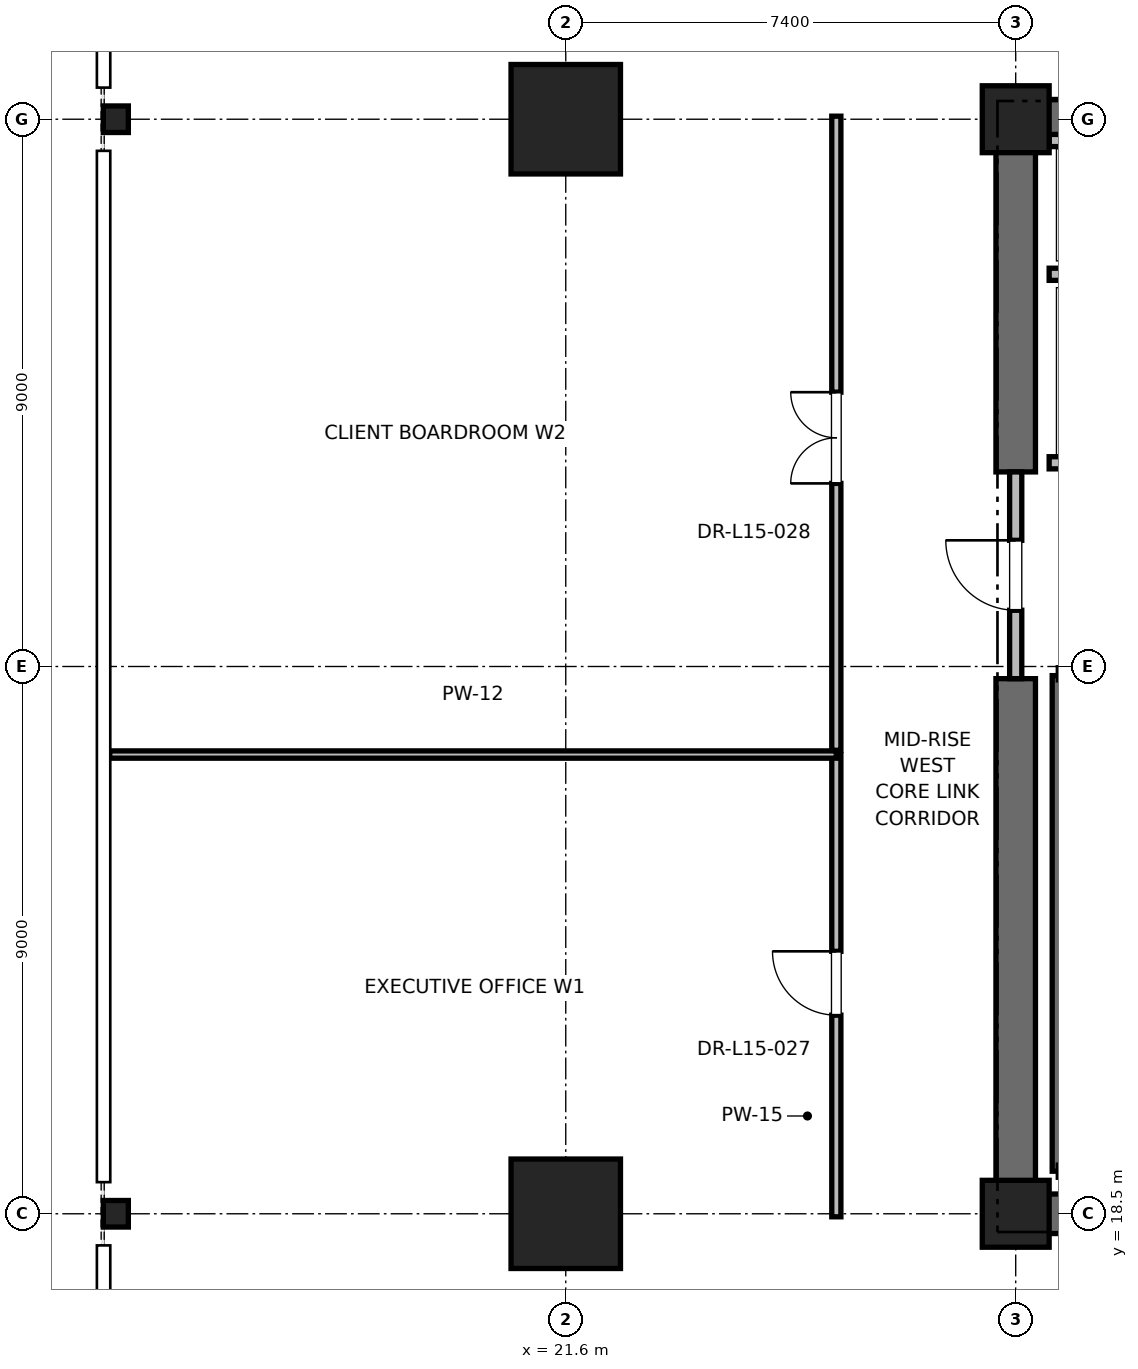
"""IFC4 building model, lengths in metres.
Left out: names, types, materials, properties, quantities, classifications, styles, units other than length and angle.
Written with IfcOpenShell. Run it as: python <this file> out.ifc"""

import sys

from ifc_helpers import new_model, si_unit, direction, frame, frame_2d, origin, origin_2d, place, context, subcontext, project, spatial, rectangle, i_section, extrude, element, fill, save


model = new_model("IFC4")
c1 = context("Model", 3, precision=1e-05, world=origin(), true_north=direction((0.0, 1.0)))
c2 = subcontext(c1, "Body", "Model", "MODEL_VIEW")
j1 = project(units=[si_unit("LENGTHUNIT", "METRE"), si_unit("PLANEANGLEUNIT", "RADIAN")], contexts=[c1])
p1 = place(None, origin())
s1 = spatial("IfcSite", under=j1, at=p1, CompositionType="ELEMENT")
p2 = place(p1, origin())
s2 = spatial("IfcBuilding", under=s1, at=p2, CompositionType="ELEMENT")
p3 = place(p2, frame((0.0, 0.0, 67.6)))
s3 = spatial("IfcBuildingStorey", under=s2, at=p3, CompositionType="ELEMENT", Elevation=67.6)
for number, where, z_axis, x_axis in (
    (1, (21.6, 18.5, 0.0), (0.0, 0.0, 1.0), (1.0, 0.0, 0.0)),
    (2, (21.6, 36.5, 0.0), (0.0, 0.0, 1.0), (1.0, 0.0, 0.0)),
):
    element("IfcColumn", number, at=place(p3, frame(where, z_axis=z_axis, x_axis=x_axis)), inside=s3, PredefinedType="COLUMN", context=c2, shape_type="SweptSolid", body=[
        extrude(rectangle(XDim=1.8, YDim=1.8, at=origin_2d()), origin(), (0.0, 0.0, 1.0), 4.0),
    ])
for number, where, z_axis, x_axis in (
    (3, (14.2, 18.5, 0.0), (0.0, 0.0, 1.0), (1.0, 0.0, 0.0)),
    (4, (14.2, 36.5, 0.0), (0.0, 0.0, 1.0), (1.0, 0.0, 0.0)),
):
    element("IfcColumn", number, at=place(p3, frame(where, z_axis=z_axis, x_axis=x_axis)), inside=s3, PredefinedType="COLUMN", context=c2, shape_type="SweptSolid", body=[
        extrude(i_section(OverallWidth=0.412, OverallDepth=0.437, WebThickness=0.036, FlangeThickness=0.058, FilletRadius=0.015, at=origin_2d()), origin(), (0.0, 0.0, 1.0), 4.0),
    ])
for number, where, z_axis, x_axis in (
    (5, (29.0, 18.5, 0.0), (0.0, 0.0, 1.0), (1.0, 0.0, 0.0)),
    (6, (29.0, 36.5, 0.0), (0.0, 0.0, 1.0), (1.0, 0.0, 0.0)),
):
    element("IfcColumn", number, at=place(p3, frame(where, z_axis=z_axis, x_axis=x_axis)), inside=s3, PredefinedType="PILASTER", context=c2, shape_type="SweptSolid", body=[
        extrude(rectangle(XDim=1.1, YDim=1.1, at=origin_2d()), origin(), (0.0, 0.0, 1.0), 4.0),
    ])
p4 = place(p3, frame((29.0, 18.5, 0.0), z_axis=(0.0, 0.0, 1.0), x_axis=(1.0, 0.0, 0.0)))
e7 = element("IfcWall", 7, at=p4, inside=s3, PredefinedType="SHEAR", context=c2, shape_type="SweptSolid", body=[
    extrude(rectangle(XDim=9.2, YDim=0.65, at=frame_2d((4.6, 0.0))), origin(), (0.0, 0.0, 1.0), 3.76),
])
p5 = place(p3, frame((29.0, 36.5, 0.0), z_axis=(0.0, 0.0, 1.0), x_axis=(1.0, 0.0, 0.0)))
e8 = element("IfcWall", 8, at=p5, inside=s3, PredefinedType="SHEAR", context=c2, shape_type="SweptSolid", body=[
    extrude(rectangle(XDim=5.8, YDim=0.65, at=frame_2d((2.9, 0.0))), origin(), (0.0, 0.0, 1.0), 3.76),
])
p6 = place(p3, frame((29.0, 18.5, 0.0), z_axis=(0.0, 0.0, 1.0), x_axis=(0.0, 1.0, 0.0)))
e9 = element("IfcWall", 9, at=p6, inside=s3, PredefinedType="SHEAR", context=c2, shape_type="SweptSolid", body=[
    extrude(rectangle(XDim=8.8, YDim=0.65, at=frame_2d((4.4, 0.0))), origin(), (0.0, 0.0, 1.0), 3.76),
])
p7 = place(p3, frame((29.0, 30.7, 0.0), z_axis=(0.0, 0.0, 1.0), x_axis=(0.0, 1.0, 0.0)))
e10 = element("IfcWall", 10, at=p7, inside=s3, PredefinedType="SHEAR", context=c2, shape_type="SweptSolid", body=[
    extrude(rectangle(XDim=5.8, YDim=0.65, at=frame_2d((2.9, 0.0))), origin(), (0.0, 0.0, 1.0), 3.76),
])
p8 = place(p3, frame((29.7, 19.2, 0.0), z_axis=(0.0, 0.0, 1.0), x_axis=(0.0, 1.0, 0.0)))
e11 = element("IfcWall", 11, at=p8, inside=s3, PredefinedType="SOLIDWALL", context=c2, shape_type="SweptSolid", body=[
    extrude(rectangle(XDim=8.15, YDim=0.2, at=frame_2d((4.075, 0.0))), origin(), (0.0, 0.0, 1.0), 3.76),
])
p9 = place(p3, frame((29.0, 27.3, 0.0), z_axis=(0.0, 0.0, 1.0), x_axis=(0.0, 1.0, 0.0)))
e12 = element("IfcWall", 12, at=p9, inside=s3, PredefinedType="PARTITIONING", context=c2, shape_type="SweptSolid", body=[
    extrude(rectangle(XDim=3.4, YDim=0.2, at=frame_2d((1.7, 0.0))), origin(), (0.0, 0.0, 1.0), 2.54),
])
p10 = place(p9, frame((1.125, 0.0, 0.0)))
e13 = element("IfcOpeningElement", 13, at=p10, cuts=e12, PredefinedType="OPENING", context=c2, shape_type="SweptSolid", body=[
    extrude(rectangle(XDim=1.15, YDim=2.2, at=frame_2d((0.575, 1.1))), frame((0.0, 0.1, 0.0), z_axis=(0.0, -1.0, 0.0), x_axis=(1.0, 0.0, 0.0)), (0.0, 0.0, 1.0), 0.2),
])
p11 = place(p3, frame((29.55, 30.85, 0.0), z_axis=(0.0, 0.0, 1.0), x_axis=(1.0, 0.0, 0.0)))
e14 = element("IfcWall", 14, at=p11, inside=s3, PredefinedType="SOLIDWALL", context=c2, shape_type="SweptSolid", body=[
    extrude(rectangle(XDim=2.6, YDim=0.2, at=frame_2d((1.3, 0.0))), origin(), (0.0, 0.0, 1.0), 2.54),
])
p12 = place(p11, frame((0.75, 0.0, 0.0)))
e15 = element("IfcOpeningElement", 15, at=p12, cuts=e14, PredefinedType="OPENING", context=c2, shape_type="SweptSolid", body=[
    extrude(rectangle(XDim=1.1, YDim=2.2, at=frame_2d((0.55, 1.1))), frame((0.0, 0.1, 0.0), z_axis=(0.0, -1.0, 0.0), x_axis=(1.0, 0.0, 0.0)), (0.0, 0.0, 1.0), 0.2),
])
p13 = place(p3, frame((29.55, 33.95, 0.0), z_axis=(0.0, 0.0, 1.0), x_axis=(1.0, 0.0, 0.0)))
e16 = element("IfcWall", 16, at=p13, inside=s3, PredefinedType="SOLIDWALL", context=c2, shape_type="SweptSolid", body=[
    extrude(rectangle(XDim=2.8, YDim=0.2, at=frame_2d((1.4, 0.0))), origin(), (0.0, 0.0, 1.0), 3.76),
])
p14 = place(p3, frame((32.35, 36.15, 0.0), z_axis=(0.0, 0.0, 1.0), x_axis=(-1.0, 0.0, 0.0)))
e17 = element("IfcWall", 17, at=p14, inside=s3, PredefinedType="SOLIDWALL", context=c2, shape_type="SweptSolid", body=[
    extrude(rectangle(XDim=2.8, YDim=0.2, at=frame_2d((1.4, 0.0))), origin(), (0.0, 0.0, 1.0), 2.889),
])
p15 = place(p3, frame((26.05, 18.45, 0.0), z_axis=(0.0, 0.0, 1.0), x_axis=(0.0, 1.0, 0.0)))
e18 = element("IfcWall", 18, at=p15, inside=s3, PredefinedType="PARTITIONING", context=c2, shape_type="SweptSolid", body=[
    extrude(rectangle(XDim=7.602, YDim=0.15, at=frame_2d((3.801, 0.0))), origin(), (0.0, 0.0, 1.0), 2.85),
])
p16 = place(p15, frame((3.316, 0.0, 0.0)))
e19 = element("IfcOpeningElement", 19, at=p16, cuts=e18, PredefinedType="OPENING", context=c2, shape_type="SweptSolid", body=[
    extrude(rectangle(XDim=1.05, YDim=2.2, at=frame_2d((0.525, 1.1))), frame((0.0, 0.075, 0.0), z_axis=(0.0, -1.0, 0.0), x_axis=(1.0, 0.0, 0.0)), (0.0, 0.0, 1.0), 0.15),
])
p17 = place(p3, frame((14.099, 26.052, 0.0), z_axis=(0.0, 0.0, 1.0), x_axis=(1.0, 0.0, 0.0)))
e20 = element("IfcWall", 20, at=p17, inside=s3, PredefinedType="PARTITIONING", context=c2, shape_type="SweptSolid", body=[
    extrude(rectangle(XDim=11.951, YDim=0.12, at=frame_2d((5.976, 0.0))), origin(), (0.0, 0.0, 1.0), 2.85),
])
p18 = place(p3, frame((26.05, 26.122, 0.0), z_axis=(0.0, 0.0, 1.0), x_axis=(0.0, 1.0, 0.0)))
e21 = element("IfcWall", 21, at=p18, inside=s3, PredefinedType="PARTITIONING", context=c2, shape_type="SweptSolid", body=[
    extrude(rectangle(XDim=10.428, YDim=0.15, at=frame_2d((5.214, 0.0))), origin(), (0.0, 0.0, 1.0), 2.85),
])
p19 = place(p18, frame((4.389, 0.0, 0.0)))
e22 = element("IfcOpeningElement", 22, at=p19, cuts=e21, PredefinedType="OPENING", context=c2, shape_type="SweptSolid", body=[
    extrude(rectangle(XDim=1.5, YDim=2.25, at=frame_2d((0.75, 1.125))), frame((0.0, 0.075, 0.0), z_axis=(0.0, -1.0, 0.0), x_axis=(1.0, 0.0, 0.0)), (0.0, 0.0, 1.0), 0.15),
])
p20 = place(p10, origin())
e23 = element("IfcDoor", 23, at=p20, inside=s3, OperationType="SINGLE_SWING_RIGHT", PredefinedType="DOOR", context=c2, shape_type="SweptSolid", body=[
    extrude(rectangle(XDim=1.15, YDim=2.2, at=frame_2d((0.575, 1.1))), frame((0.0, 0.025, 0.0), z_axis=(0.0, -1.0, 0.0), x_axis=(1.0, 0.0, 0.0)), (0.0, 0.0, 1.0), 0.05),
])
fill(e13, e23)
p21 = place(p16, origin())
e24 = element("IfcDoor", 24, at=p21, inside=s3, OperationType="SINGLE_SWING_RIGHT", PredefinedType="DOOR", context=c2, shape_type="SweptSolid", body=[
    extrude(rectangle(XDim=1.05, YDim=2.2, at=frame_2d((0.525, 1.1))), frame((0.0, 0.025, 0.0), z_axis=(0.0, -1.0, 0.0), x_axis=(1.0, 0.0, 0.0)), (0.0, 0.0, 1.0), 0.05),
])
fill(e19, e24)
p22 = place(p19, origin())
e25 = element("IfcDoor", 25, at=p22, inside=s3, OperationType="DOUBLE_DOOR_SINGLE_SWING", PredefinedType="DOOR", context=c2, shape_type="SweptSolid", body=[
    extrude(rectangle(XDim=1.5, YDim=2.25, at=frame_2d((0.75, 1.125))), frame((0.0, 0.025, 0.0), z_axis=(0.0, -1.0, 0.0), x_axis=(1.0, 0.0, 0.0)), (0.0, 0.0, 1.0), 0.05),
])
fill(e22, e25)
save(model, sys.argv[1])
